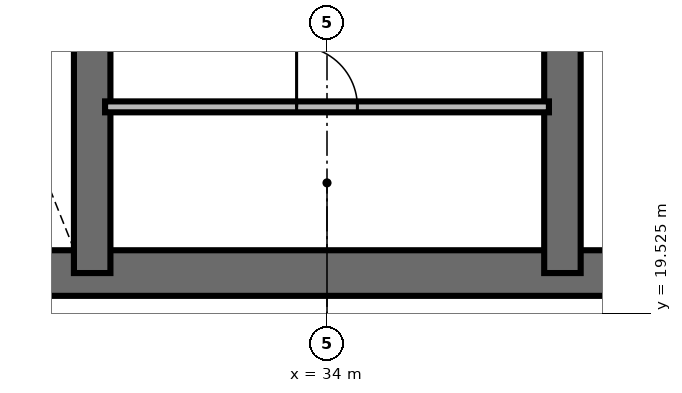
"""IFC4 building model, lengths in metres.
Left out: names, types, materials, properties, quantities, classifications, styles, units other than length and angle.
Written with IfcOpenShell. Run it as: python <this file> out.ifc"""

import sys

from ifc_helpers import new_model, si_unit, direction, frame, frame_2d, origin, place, context, subcontext, project, spatial, rectangle, extrude, element, fill, save


model = new_model("IFC4")
c1 = context("Model", 3, precision=1e-05, world=origin(), true_north=direction((0.0, 1.0)))
c2 = subcontext(c1, "Body", "Model", "MODEL_VIEW")
j1 = project(units=[si_unit("LENGTHUNIT", "METRE"), si_unit("PLANEANGLEUNIT", "RADIAN")], contexts=[c1])
p1 = place(None, origin())
s1 = spatial("IfcSite", under=j1, at=p1, CompositionType="ELEMENT")
p2 = place(p1, origin())
s2 = spatial("IfcBuilding", under=s1, at=p2, CompositionType="ELEMENT")
p3 = place(p2, frame((0.0, 0.0, 188.0)))
s3 = spatial("IfcBuildingStorey", under=s2, at=p3, CompositionType="ELEMENT", Elevation=188.0)
p4 = place(p3, frame((26.072, 20.187, 0.0), z_axis=(0.0, 0.0, 1.0), x_axis=(1.0, 0.0, 0.0)))
e1 = element("IfcWall", 1, at=p4, inside=s3, PredefinedType="SHEAR", context=c2, shape_type="SweptSolid", body=[
    extrude(rectangle(XDim=15.866, YDim=0.75, at=frame_2d((7.933, 0.0))), origin(), (0.0, 0.0, 1.0), 3.6),
])
for number, where, z_axis, x_axis in (
    (2, (30.138, 20.187, 0.0), (0.0, 0.0, 1.0), (0.0, 1.0, 0.0)),
    (3, (37.872, 20.187, 0.0), (0.0, 0.0, 1.0), (0.0, 1.0, 0.0)),
):
    element("IfcWall", number, at=place(p3, frame(where, z_axis=z_axis, x_axis=x_axis)), inside=s3, PredefinedType="SHEAR", context=c2, shape_type="SweptSolid", body=[
        extrude(rectangle(XDim=9.826, YDim=0.6, at=frame_2d((4.913, 0.0))), origin(), (0.0, 0.0, 1.0), 3.6),
    ])
p5 = place(p3, frame((30.35, 22.92, 0.0), z_axis=(0.0, 0.0, 1.0), x_axis=(1.0, 0.0, 0.0)))
e4 = element("IfcWall", 4, at=p5, inside=s3, PredefinedType="PARTITIONING", context=c2, shape_type="SweptSolid", body=[
    extrude(rectangle(XDim=7.3, YDim=0.18, at=frame_2d((3.65, 0.0))), origin(), (0.0, 0.0, 1.0), 2.46),
])
p6 = place(p5, frame((3.15, 0.0, 0.0)))
e5 = element("IfcOpeningElement", 5, at=p6, cuts=e4, PredefinedType="OPENING", context=c2, shape_type="SweptSolid", body=[
    extrude(rectangle(XDim=1.0, YDim=2.15, at=frame_2d((0.5, 1.075))), frame((0.0, 0.1, 0.0), z_axis=(0.0, -1.0, 0.0), x_axis=(1.0, 0.0, 0.0)), (0.0, 0.0, 1.0), 0.2),
])
p7 = place(p6, origin())
e6 = element("IfcDoor", 6, at=p7, inside=s3, OperationType="SINGLE_SWING_LEFT", PredefinedType="DOOR", context=c2, shape_type="SweptSolid", body=[
    extrude(rectangle(XDim=1.0, YDim=2.15, at=frame_2d((0.5, 1.075))), frame((0.0, 0.025, 0.0), z_axis=(0.0, -1.0, 0.0), x_axis=(1.0, 0.0, 0.0)), (0.0, 0.0, 1.0), 0.05),
])
fill(e5, e6)
save(model, sys.argv[1])
